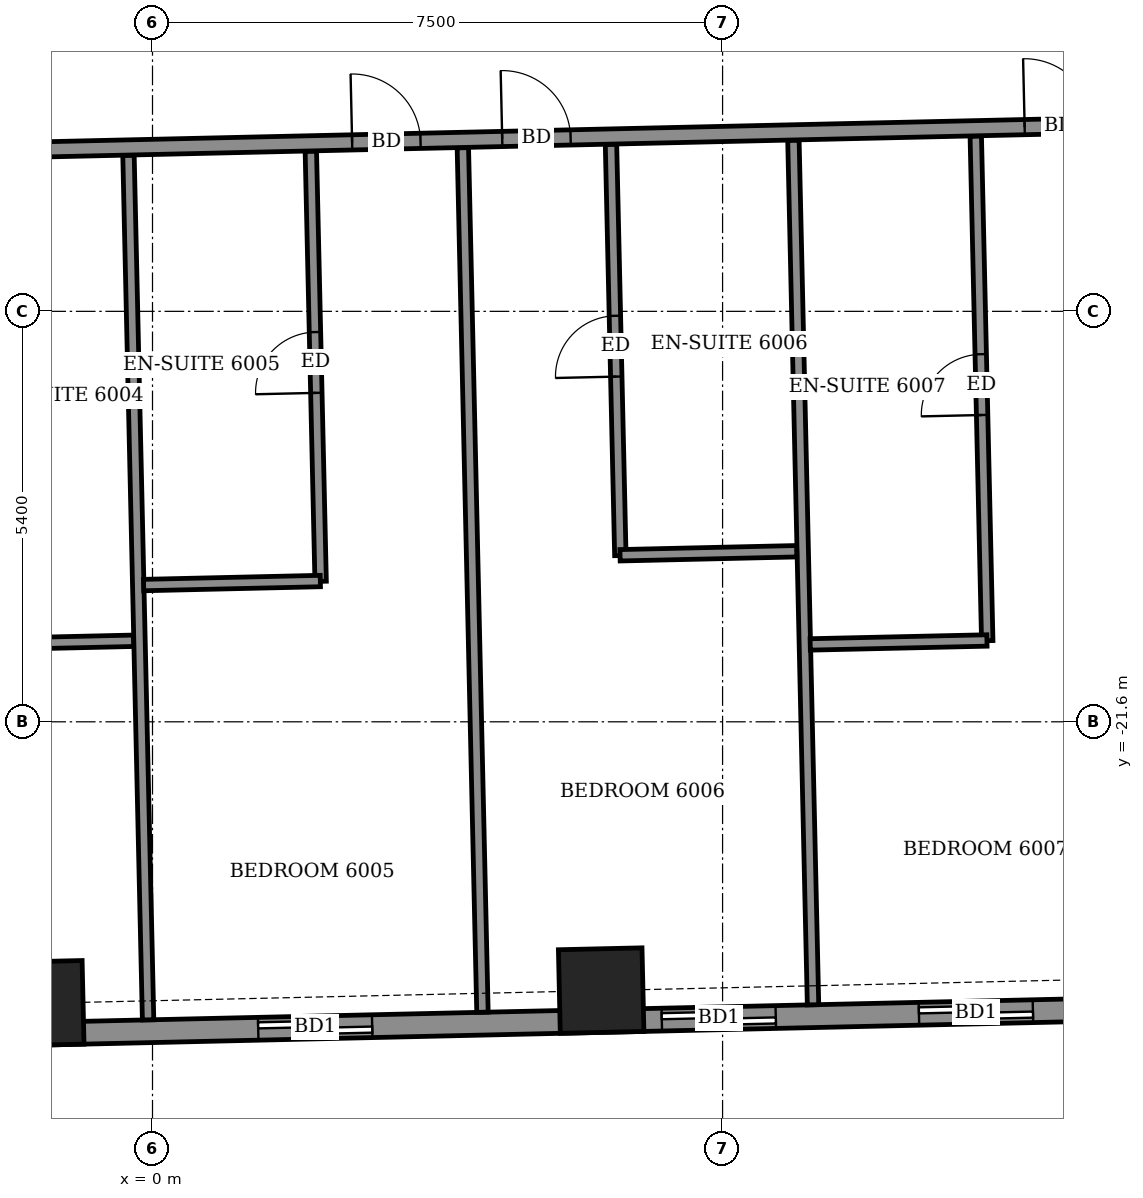
"""IFC4 building model, lengths in metres.
Left out: names, types, materials, properties, quantities, classifications, styles, units other than length and angle.
Written with IfcOpenShell. Run it as: python <this file> out.ifc"""

import sys

from ifc_helpers import new_model, si_unit, direction, frame, frame_2d, origin, origin_2d, place, context, subcontext, project, spatial, rectangle, extrude, element, fill, save


model = new_model("IFC4")
c1 = context("Model", 3, precision=1e-05, world=origin(), true_north=direction((0.0, 1.0)))
c2 = subcontext(c1, "Body", "Model", "MODEL_VIEW")
j1 = project(units=[si_unit("LENGTHUNIT", "METRE"), si_unit("PLANEANGLEUNIT", "RADIAN")], contexts=[c1])
p1 = place(None, origin())
s1 = spatial("IfcSite", under=j1, at=p1, CompositionType="ELEMENT")
p2 = place(p1, origin())
s2 = spatial("IfcBuilding", under=s1, at=p2, CompositionType="ELEMENT")
p3 = place(p2, frame((0.0, 0.0, 238.3)))
s3 = spatial("IfcBuildingStorey", under=s2, at=p3, CompositionType="ELEMENT", Elevation=238.3)
for number, where, z_axis, x_axis in (
    (1, (-1.463, -25.303, -0.55), (0.0, 0.0, 1.0), (1.0, 0.023, 0.0)),
    (2, (5.903, -25.136, -0.55), (0.0, 0.0, 1.0), (1.0, 0.023, 0.0)),
):
    element("IfcColumn", number, at=place(p3, frame(where, z_axis=z_axis, x_axis=x_axis)), inside=s3, PredefinedType="COLUMN", context=c2, shape_type="SweptSolid", body=[
        extrude(rectangle(XDim=1.1, YDim=1.1, at=origin_2d()), origin(), (0.0, 0.0, 1.0), 3.6),
    ])
p4 = place(p3, frame((-23.403, -26.201, 0.0), z_axis=(0.0, 0.0, 1.0), x_axis=(0.999742770494, 0.022680230258, 0.0)))
e3 = element("IfcWall", 3, at=p4, inside=s3, PredefinedType="SOLIDWALL", context=c2, shape_type="SweptSolid", body=[
    extrude(rectangle(XDim=43.908, YDim=0.3, at=frame_2d((21.954, 0.0))), origin(), (0.0, 0.0, 1.0), 2.55),
])
p5 = place(p4, frame((2.124, 0.0, 0.0)))
e4 = element("IfcOpeningElement", 4, at=p5, cuts=e3, PredefinedType="OPENING", context=c2, shape_type="SweptSolid", body=[
    extrude(rectangle(XDim=1.5, YDim=2.4, at=frame_2d((0.75, 1.2))), frame((0.0, 0.16, 0.0), z_axis=(0.0, -1.0, 0.0), x_axis=(1.0, 0.0, 0.0)), (0.0, 0.0, 1.0), 0.32),
])
p6 = place(p4, frame((8.009, 0.0, 0.0)))
e5 = element("IfcOpeningElement", 5, at=p6, cuts=e3, PredefinedType="OPENING", context=c2, shape_type="SweptSolid", body=[
    extrude(rectangle(XDim=1.2, YDim=2.4, at=frame_2d((0.6, 1.2))), frame((0.0, 0.16, 0.0), z_axis=(0.0, -1.0, 0.0), x_axis=(1.0, 0.0, 0.0)), (0.0, 0.0, 1.0), 0.32),
])
p7 = place(p4, frame((11.225, 0.0, 0.0)))
e6 = element("IfcOpeningElement", 6, at=p7, cuts=e3, PredefinedType="OPENING", context=c2, shape_type="SweptSolid", body=[
    extrude(rectangle(XDim=1.5, YDim=2.4, at=frame_2d((0.75, 1.2))), frame((0.0, 0.16, 0.0), z_axis=(0.0, -1.0, 0.0), x_axis=(1.0, 0.0, 0.0)), (0.0, 0.0, 1.0), 0.32),
])
p8 = place(p4, frame((16.093, 0.0, 0.0)))
e7 = element("IfcOpeningElement", 7, at=p8, cuts=e3, PredefinedType="OPENING", context=c2, shape_type="SweptSolid", body=[
    extrude(rectangle(XDim=1.5, YDim=2.4, at=frame_2d((0.75, 1.2))), frame((0.0, 0.16, 0.0), z_axis=(0.0, -1.0, 0.0), x_axis=(1.0, 0.0, 0.0)), (0.0, 0.0, 1.0), 0.32),
])
p9 = place(p4, frame((19.477, 0.0, 0.0)))
e8 = element("IfcOpeningElement", 8, at=p9, cuts=e3, PredefinedType="OPENING", context=c2, shape_type="SweptSolid", body=[
    extrude(rectangle(XDim=1.5, YDim=2.4, at=frame_2d((0.75, 1.2))), frame((0.0, 0.16, 0.0), z_axis=(0.0, -1.0, 0.0), x_axis=(1.0, 0.0, 0.0)), (0.0, 0.0, 1.0), 0.32),
])
p10 = place(p4, frame((24.8, 0.0, 0.0)))
e9 = element("IfcOpeningElement", 9, at=p10, cuts=e3, PredefinedType="OPENING", context=c2, shape_type="SweptSolid", body=[
    extrude(rectangle(XDim=1.5, YDim=2.4, at=frame_2d((0.75, 1.2))), frame((0.0, 0.16, 0.0), z_axis=(0.0, -1.0, 0.0), x_axis=(1.0, 0.0, 0.0)), (0.0, 0.0, 1.0), 0.32),
])
p11 = place(p4, frame((30.111, 0.0, 0.0)))
e10 = element("IfcOpeningElement", 10, at=p11, cuts=e3, PredefinedType="OPENING", context=c2, shape_type="SweptSolid", body=[
    extrude(rectangle(XDim=1.5, YDim=2.4, at=frame_2d((0.75, 1.2))), frame((0.0, 0.16, 0.0), z_axis=(0.0, -1.0, 0.0), x_axis=(1.0, 0.0, 0.0)), (0.0, 0.0, 1.0), 0.32),
])
p12 = place(p4, frame((33.495, 0.0, 0.0)))
e11 = element("IfcOpeningElement", 11, at=p12, cuts=e3, PredefinedType="OPENING", context=c2, shape_type="SweptSolid", body=[
    extrude(rectangle(XDim=1.5, YDim=2.4, at=frame_2d((0.75, 1.2))), frame((0.0, 0.16, 0.0), z_axis=(0.0, -1.0, 0.0), x_axis=(1.0, 0.0, 0.0)), (0.0, 0.0, 1.0), 0.32),
])
p13 = place(p4, frame((38.245, 0.0, 0.0)))
e12 = element("IfcOpeningElement", 12, at=p13, cuts=e3, PredefinedType="OPENING", context=c2, shape_type="SweptSolid", body=[
    extrude(rectangle(XDim=1.5, YDim=2.4, at=frame_2d((0.75, 1.2))), frame((0.0, 0.16, 0.0), z_axis=(0.0, -1.0, 0.0), x_axis=(1.0, 0.0, 0.0)), (0.0, 0.0, 1.0), 0.32),
])
p14 = place(p4, frame((41.482, 0.0, 0.9)))
e13 = element("IfcOpeningElement", 13, at=p14, cuts=e3, PredefinedType="OPENING", context=c2, shape_type="SweptSolid", body=[
    extrude(rectangle(XDim=1.2, YDim=1.5, at=frame_2d((0.6, 0.75))), frame((0.0, 0.16, 0.0), z_axis=(0.0, -1.0, 0.0), x_axis=(1.0, 0.0, 0.0)), (0.0, 0.0, 1.0), 0.32),
])
p15 = place(p3, frame((-0.058, -25.521, 0.0), z_axis=(0.0, 0.0, 1.0), x_axis=(-0.022662905301, 0.999743163379, 0.0)))
e14 = element("IfcWall", 14, at=p15, inside=s3, PredefinedType="PARTITIONING", context=c2, shape_type="SweptSolid", body=[
    extrude(rectangle(XDim=11.376, YDim=0.15, at=frame_2d((5.688, 0.0))), origin(), (0.0, 0.0, 1.0), 2.5),
])
p16 = place(p3, frame((4.341, -25.421, 0.0), z_axis=(0.0, 0.0, 1.0), x_axis=(-0.022684842063, 0.99974266586, 0.0)))
e15 = element("IfcWall", 15, at=p16, inside=s3, PredefinedType="PARTITIONING", context=c2, shape_type="SweptSolid", body=[
    extrude(rectangle(XDim=11.376, YDim=0.15, at=frame_2d((5.688, 0.0))), origin(), (0.0, 0.0, 1.0), 2.5),
])
p17 = place(p3, frame((8.69, -25.323, 0.0), z_axis=(0.0, 0.0, 1.0), x_axis=(-0.022684355347, 0.999742676904, 0.0)))
e16 = element("IfcWall", 16, at=p17, inside=s3, PredefinedType="PARTITIONING", context=c2, shape_type="SweptSolid", body=[
    extrude(rectangle(XDim=11.376, YDim=0.15, at=frame_2d((5.688, 0.0))), origin(), (0.0, 0.0, 1.0), 2.5),
])
p18 = place(p3, frame((10.982, -20.533, 0.0), z_axis=(0.0, 0.0, 1.0), x_axis=(-0.02272391111, 0.999741778593, 0.0)))
e17 = element("IfcWall", 17, at=p18, inside=s3, PredefinedType="PARTITIONING", context=c2, shape_type="SweptSolid", body=[
    extrude(rectangle(XDim=6.64, YDim=0.15, at=frame_2d((3.32, 0.0))), origin(), (0.0, 0.0, 1.0), 3.05),
])
p19 = place(p18, frame((2.97, 0.0, 0.0)))
e18 = element("IfcOpeningElement", 18, at=p19, cuts=e17, PredefinedType="OPENING", context=c2, shape_type="SweptSolid", body=[
    extrude(rectangle(XDim=0.8, YDim=2.1, at=frame_2d((0.4, 1.05))), frame((0.0, 0.085, 0.0), z_axis=(0.0, -1.0, 0.0), x_axis=(1.0, 0.0, 0.0)), (0.0, 0.0, 1.0), 0.17),
])
for number, where, z_axis, x_axis in (
    (19, (8.653, -20.582, 0.0), (0.0, 0.0, 1.0), (1.0, 0.022, 0.0)),
    (20, (-2.575, -20.587, 0.0), (0.0, 0.0, 1.0), (1.0, 0.023, 0.0)),
):
    element("IfcWall", number, at=place(p3, frame(where, z_axis=z_axis, x_axis=x_axis)), inside=s3, PredefinedType="PARTITIONING", context=c2, shape_type="SweptSolid", body=[
        extrude(rectangle(XDim=2.325, YDim=0.15, at=frame_2d((1.163, 0.0))), origin(), (0.0, 0.0, 1.0), 3.05),
    ])
p20 = place(p3, frame((2.212, -19.752, 0.0), z_axis=(0.0, 0.0, 1.0), x_axis=(-0.022777260759, 0.999740564543, 0.0)))
e21 = element("IfcWall", 21, at=p20, inside=s3, PredefinedType="PARTITIONING", context=c2, shape_type="SweptSolid", body=[
    extrude(rectangle(XDim=5.659, YDim=0.15, at=frame_2d((2.83, 0.0))), origin(), (0.0, 0.0, 1.0), 3.05),
])
p21 = place(p20, frame((2.48, 0.0, 0.0)))
e22 = element("IfcOpeningElement", 22, at=p21, cuts=e21, PredefinedType="OPENING", context=c2, shape_type="SweptSolid", body=[
    extrude(rectangle(XDim=0.8, YDim=2.1, at=frame_2d((0.4, 1.05))), frame((0.0, 0.085, 0.0), z_axis=(0.0, -1.0, 0.0), x_axis=(1.0, 0.0, 0.0)), (0.0, 0.0, 1.0), 0.17),
])
p22 = place(p3, frame((-0.117, -19.801, 0.0), z_axis=(0.0, 0.0, 1.0), x_axis=(0.999740478815, 0.022781023197, 0.0)))
e23 = element("IfcWall", 23, at=p22, inside=s3, PredefinedType="PARTITIONING", context=c2, shape_type="SweptSolid", body=[
    extrude(rectangle(XDim=2.325, YDim=0.15, at=frame_2d((1.163, 0.0))), origin(), (0.0, 0.0, 1.0), 3.05),
])
p23 = place(p3, frame((6.155, -19.413, 0.0), z_axis=(0.0, 0.0, 1.0), x_axis=(-0.022741905136, 0.999741369431, 0.0)))
e24 = element("IfcWall", 24, at=p23, inside=s3, PredefinedType="PARTITIONING", context=c2, shape_type="SweptSolid", body=[
    extrude(rectangle(XDim=5.411, YDim=0.15, at=frame_2d((2.705, 0.0))), origin(), (0.0, 0.0, 1.0), 3.05),
])
p24 = place(p23, frame((2.355, 0.0, 0.0)))
e25 = element("IfcOpeningElement", 25, at=p24, cuts=e24, PredefinedType="OPENING", context=c2, shape_type="SweptSolid", body=[
    extrude(rectangle(XDim=0.8, YDim=2.1, at=frame_2d((0.4, 1.05))), frame((0.0, 0.085, 0.0), z_axis=(0.0, -1.0, 0.0), x_axis=(1.0, 0.0, 0.0)), (0.0, 0.0, 1.0), 0.17),
])
p25 = place(p3, frame((6.151, -19.409, 0.0), z_axis=(0.0, 0.0, 1.0), x_axis=(0.99974031529, 0.022788198363, 0.0)))
e26 = element("IfcWall", 26, at=p25, inside=s3, PredefinedType="PARTITIONING", context=c2, shape_type="SweptSolid", body=[
    extrude(rectangle(XDim=2.325, YDim=0.15, at=frame_2d((1.162, 0.0))), origin(), (0.0, 0.0, 1.0), 3.05),
])
p26 = place(p3, frame((-27.016, -14.65, 0.0), z_axis=(0.0, 0.0, 1.0), x_axis=(0.999742623033, 0.022686729391, 0.0)))
e27 = element("IfcWall", 27, at=p26, inside=s3, PredefinedType="PARTITIONING", context=c2, shape_type="SweptSolid", body=[
    extrude(rectangle(XDim=50.858, YDim=0.2, at=frame_2d((25.429, 0.0))), origin(), (0.0, 0.0, 1.0), 3.05),
])
p27 = place(p26, frame((1.625, 0.0, 0.0)))
e28 = element("IfcOpeningElement", 28, at=p27, cuts=e27, PredefinedType="OPENING", context=c2, shape_type="SweptSolid", body=[
    extrude(rectangle(XDim=1.0, YDim=2.1, at=frame_2d((0.5, 1.05))), frame((0.0, 0.11, 0.0), z_axis=(0.0, -1.0, 0.0), x_axis=(1.0, 0.0, 0.0)), (0.0, 0.0, 1.0), 0.22),
])
p28 = place(p26, frame((6.6, 0.0, 0.0)))
e29 = element("IfcOpeningElement", 29, at=p28, cuts=e27, PredefinedType="OPENING", context=c2, shape_type="SweptSolid", body=[
    extrude(rectangle(XDim=0.9, YDim=2.1, at=frame_2d((0.45, 1.05))), frame((0.0, 0.11, 0.0), z_axis=(0.0, -1.0, 0.0), x_axis=(1.0, 0.0, 0.0)), (0.0, 0.0, 1.0), 0.22),
])
p29 = place(p26, frame((11.5, 0.0, 0.0)))
e30 = element("IfcOpeningElement", 30, at=p29, cuts=e27, PredefinedType="OPENING", context=c2, shape_type="SweptSolid", body=[
    extrude(rectangle(XDim=0.9, YDim=2.1, at=frame_2d((0.45, 1.05))), frame((0.0, 0.11, 0.0), z_axis=(0.0, -1.0, 0.0), x_axis=(1.0, 0.0, 0.0)), (0.0, 0.0, 1.0), 0.22),
])
p30 = place(p26, frame((13.675, 0.0, 0.0)))
e31 = element("IfcOpeningElement", 31, at=p30, cuts=e27, PredefinedType="OPENING", context=c2, shape_type="SweptSolid", body=[
    extrude(rectangle(XDim=0.9, YDim=2.1, at=frame_2d((0.45, 1.05))), frame((0.0, 0.11, 0.0), z_axis=(0.0, -1.0, 0.0), x_axis=(1.0, 0.0, 0.0)), (0.0, 0.0, 1.0), 0.22),
])
p31 = place(p26, frame((20.625, 0.0, 0.0)))
e32 = element("IfcOpeningElement", 32, at=p31, cuts=e27, PredefinedType="OPENING", context=c2, shape_type="SweptSolid", body=[
    extrude(rectangle(XDim=0.9, YDim=2.1, at=frame_2d((0.45, 1.05))), frame((0.0, 0.11, 0.0), z_axis=(0.0, -1.0, 0.0), x_axis=(1.0, 0.0, 0.0)), (0.0, 0.0, 1.0), 0.22),
])
p32 = place(p26, frame((22.775, 0.0, 0.0)))
e33 = element("IfcOpeningElement", 33, at=p32, cuts=e27, PredefinedType="OPENING", context=c2, shape_type="SweptSolid", body=[
    extrude(rectangle(XDim=0.9, YDim=2.1, at=frame_2d((0.45, 1.05))), frame((0.0, 0.11, 0.0), z_axis=(0.0, -1.0, 0.0), x_axis=(1.0, 0.0, 0.0)), (0.0, 0.0, 1.0), 0.22),
])
p33 = place(p26, frame((29.65, 0.0, 0.0)))
e34 = element("IfcOpeningElement", 34, at=p33, cuts=e27, PredefinedType="OPENING", context=c2, shape_type="SweptSolid", body=[
    extrude(rectangle(XDim=0.9, YDim=2.1, at=frame_2d((0.45, 1.05))), frame((0.0, 0.11, 0.0), z_axis=(0.0, -1.0, 0.0), x_axis=(1.0, 0.0, 0.0)), (0.0, 0.0, 1.0), 0.22),
])
p34 = place(p26, frame((31.625, 0.0, 0.0)))
e35 = element("IfcOpeningElement", 35, at=p34, cuts=e27, PredefinedType="OPENING", context=c2, shape_type="SweptSolid", body=[
    extrude(rectangle(XDim=0.9, YDim=2.1, at=frame_2d((0.45, 1.05))), frame((0.0, 0.11, 0.0), z_axis=(0.0, -1.0, 0.0), x_axis=(1.0, 0.0, 0.0)), (0.0, 0.0, 1.0), 0.22),
])
p35 = place(p26, frame((38.5, 0.0, 0.0)))
e36 = element("IfcOpeningElement", 36, at=p35, cuts=e27, PredefinedType="OPENING", context=c2, shape_type="SweptSolid", body=[
    extrude(rectangle(XDim=0.9, YDim=2.1, at=frame_2d((0.45, 1.05))), frame((0.0, 0.11, 0.0), z_axis=(0.0, -1.0, 0.0), x_axis=(1.0, 0.0, 0.0)), (0.0, 0.0, 1.0), 0.22),
])
p36 = place(p26, frame((40.55, 0.0, 0.0)))
e37 = element("IfcOpeningElement", 37, at=p36, cuts=e27, PredefinedType="OPENING", context=c2, shape_type="SweptSolid", body=[
    extrude(rectangle(XDim=0.9, YDim=2.1, at=frame_2d((0.45, 1.05))), frame((0.0, 0.11, 0.0), z_axis=(0.0, -1.0, 0.0), x_axis=(1.0, 0.0, 0.0)), (0.0, 0.0, 1.0), 0.22),
])
p37 = place(p26, frame((47.601, 0.0, 0.0)))
e38 = element("IfcOpeningElement", 38, at=p37, cuts=e27, PredefinedType="OPENING", context=c2, shape_type="SweptSolid", body=[
    extrude(rectangle(XDim=1.0, YDim=2.1, at=frame_2d((0.5, 1.05))), frame((0.0, 0.11, 0.0), z_axis=(0.0, -1.0, 0.0), x_axis=(1.0, 0.0, 0.0)), (0.0, 0.0, 1.0), 0.22),
])
p38 = place(p10, origin())
e39 = element("IfcDoor", 39, at=p38, inside=s3, OperationType="SLIDING_TO_LEFT", PredefinedType="DOOR", context=c2, shape_type="SweptSolid", body=[
    extrude(rectangle(XDim=1.5, YDim=2.4, at=frame_2d((0.75, 1.2))), frame((0.0, 0.025, 0.0), z_axis=(0.0, -1.0, 0.0), x_axis=(1.0, 0.0, 0.0)), (0.0, 0.0, 1.0), 0.05),
])
fill(e9, e39)
p39 = place(p11, origin())
e40 = element("IfcDoor", 40, at=p39, inside=s3, OperationType="SLIDING_TO_LEFT", PredefinedType="DOOR", context=c2, shape_type="SweptSolid", body=[
    extrude(rectangle(XDim=1.5, YDim=2.4, at=frame_2d((0.75, 1.2))), frame((0.0, 0.025, 0.0), z_axis=(0.0, -1.0, 0.0), x_axis=(1.0, 0.0, 0.0)), (0.0, 0.0, 1.0), 0.05),
])
fill(e10, e40)
p40 = place(p12, origin())
e41 = element("IfcDoor", 41, at=p40, inside=s3, OperationType="SLIDING_TO_LEFT", PredefinedType="DOOR", context=c2, shape_type="SweptSolid", body=[
    extrude(rectangle(XDim=1.5, YDim=2.4, at=frame_2d((0.75, 1.2))), frame((0.0, 0.025, 0.0), z_axis=(0.0, -1.0, 0.0), x_axis=(1.0, 0.0, 0.0)), (0.0, 0.0, 1.0), 0.05),
])
fill(e11, e41)
p41 = place(p33, origin())
e42 = element("IfcDoor", 42, at=p41, inside=s3, OperationType="SINGLE_SWING_LEFT", PredefinedType="DOOR", context=c2, shape_type="SweptSolid", body=[
    extrude(rectangle(XDim=0.9, YDim=2.1, at=frame_2d((0.45, 1.05))), frame((0.0, 0.025, 0.0), z_axis=(0.0, -1.0, 0.0), x_axis=(1.0, 0.0, 0.0)), (0.0, 0.0, 1.0), 0.05),
])
fill(e34, e42)
p42 = place(p21, origin())
e43 = element("IfcDoor", 43, at=p42, inside=s3, OperationType="SINGLE_SWING_LEFT", PredefinedType="DOOR", context=c2, shape_type="SweptSolid", body=[
    extrude(rectangle(XDim=0.8, YDim=2.1, at=frame_2d((0.4, 1.05))), frame((0.0, 0.025, 0.0), z_axis=(0.0, -1.0, 0.0), x_axis=(1.0, 0.0, 0.0)), (0.0, 0.0, 1.0), 0.05),
])
fill(e22, e43)
p43 = place(p34, origin())
e44 = element("IfcDoor", 44, at=p43, inside=s3, OperationType="SINGLE_SWING_RIGHT", PredefinedType="DOOR", context=c2, shape_type="SweptSolid", body=[
    extrude(rectangle(XDim=0.9, YDim=2.1, at=frame_2d((0.45, 1.05))), frame((0.0, 0.025, 0.0), z_axis=(0.0, -1.0, 0.0), x_axis=(1.0, 0.0, 0.0)), (0.0, 0.0, 1.0), 0.05),
])
fill(e35, e44)
p44 = place(p24, origin())
e45 = element("IfcDoor", 45, at=p44, inside=s3, OperationType="SINGLE_SWING_RIGHT", PredefinedType="DOOR", context=c2, shape_type="SweptSolid", body=[
    extrude(rectangle(XDim=0.8, YDim=2.1, at=frame_2d((0.4, 1.05))), frame((0.0, 0.025, 0.0), z_axis=(0.0, -1.0, 0.0), x_axis=(1.0, 0.0, 0.0)), (0.0, 0.0, 1.0), 0.05),
])
fill(e25, e45)
p45 = place(p35, origin())
e46 = element("IfcDoor", 46, at=p45, inside=s3, OperationType="SINGLE_SWING_LEFT", PredefinedType="DOOR", context=c2, shape_type="SweptSolid", body=[
    extrude(rectangle(XDim=0.9, YDim=2.1, at=frame_2d((0.45, 1.05))), frame((0.0, 0.025, 0.0), z_axis=(0.0, -1.0, 0.0), x_axis=(1.0, 0.0, 0.0)), (0.0, 0.0, 1.0), 0.05),
])
fill(e36, e46)
p46 = place(p19, origin())
e47 = element("IfcDoor", 47, at=p46, inside=s3, OperationType="SINGLE_SWING_LEFT", PredefinedType="DOOR", context=c2, shape_type="SweptSolid", body=[
    extrude(rectangle(XDim=0.8, YDim=2.1, at=frame_2d((0.4, 1.05))), frame((0.0, 0.025, 0.0), z_axis=(0.0, -1.0, 0.0), x_axis=(1.0, 0.0, 0.0)), (0.0, 0.0, 1.0), 0.05),
])
fill(e18, e47)
save(model, sys.argv[1])
